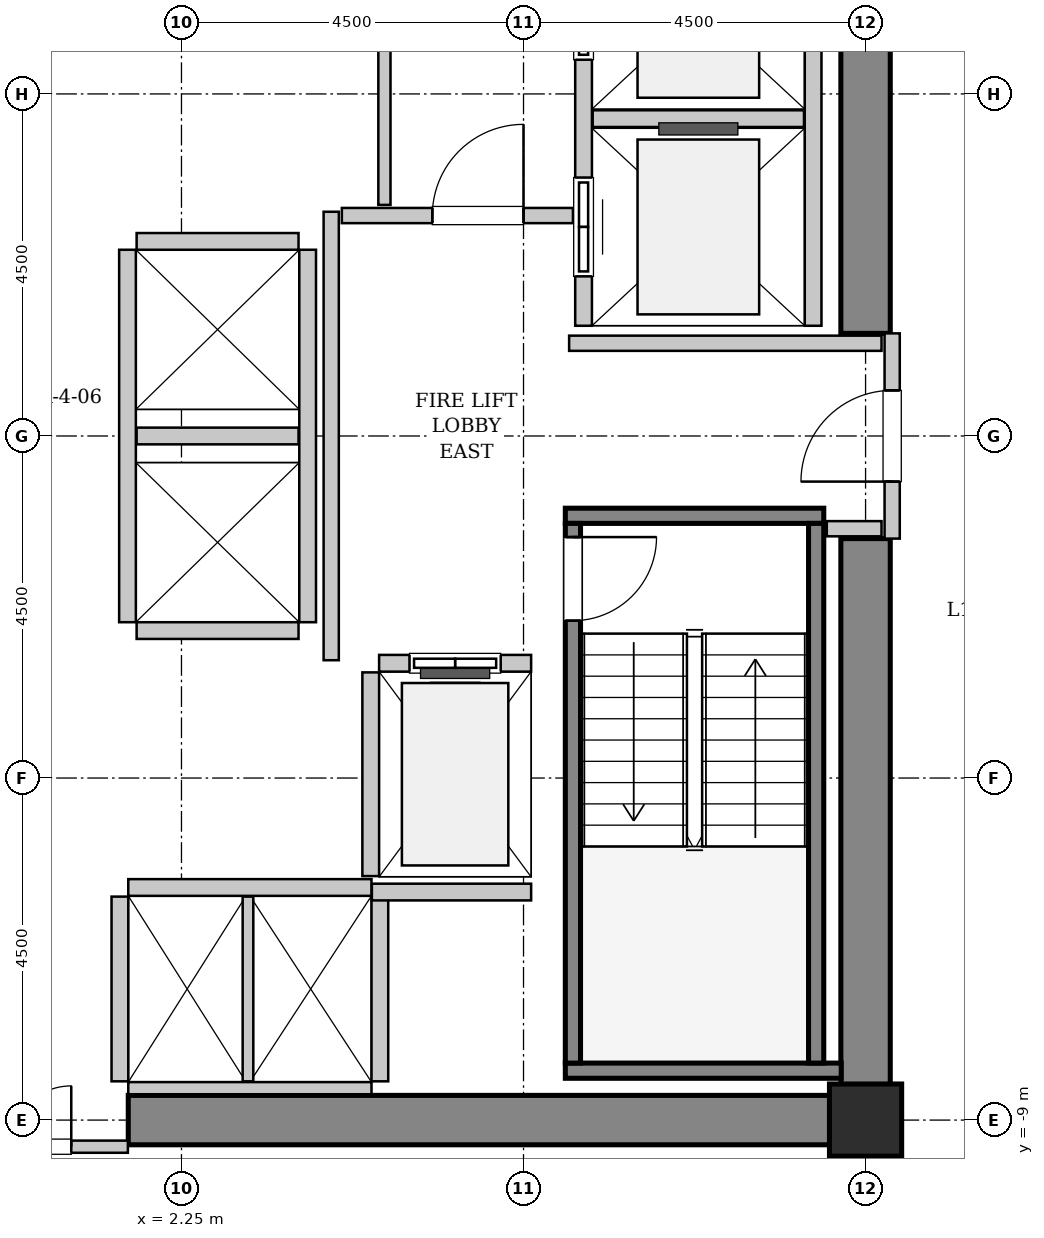
"""IFC4 building model, lengths in metres.
Left out: names, types, materials, properties, quantities, classifications, styles, units other than length and angle.
Written with IfcOpenShell. Run it as: python <this file> out.ifc"""

import sys

from ifc_helpers import new_model, si_unit, direction, frame, frame_2d, origin, origin_2d, place, context, subcontext, project, spatial, rectangle, hollow_rectangle, extrude, source, transform, mapped, element, fill, save


model = new_model("IFC4")
c1 = context("Model", 3, precision=1e-05, world=origin(), true_north=direction((0.0, 1.0)))
c2 = subcontext(c1, "Body", "Model", "MODEL_VIEW")
j1 = project(units=[si_unit("LENGTHUNIT", "METRE"), si_unit("PLANEANGLEUNIT", "RADIAN")], contexts=[c1])
p1 = place(None, origin())
s1 = spatial("IfcSite", under=j1, at=p1, CompositionType="ELEMENT")
p2 = place(p1, origin())
s2 = spatial("IfcBuilding", under=s1, at=p2, CompositionType="ELEMENT")
p3 = place(p2, frame((0.0, 0.0, 63.4)))
s3 = spatial("IfcBuildingStorey", under=s2, at=p3, CompositionType="ELEMENT", Elevation=63.4)
m1 = source(origin(), c2, "Body", "SweptSolid", [
    extrude(rectangle(XDim=10.025, YDim=0.65, at=frame_2d((5.012, 0.0))), origin(), (0.0, 0.0, 1.0), 3.8),
])
p4 = place(p3, frame((1.55, -9.0, 0.0), z_axis=(0.0, 0.0, 1.0), x_axis=(1.0, 0.0, 0.0)))
e1 = element("IfcWall", 1, at=p4, inside=s3, PredefinedType="SHEAR", context=c2, shape_type="MappedRepresentation", body=[
    mapped(m1, transform((0.0, 0.0, 0.0), x_axis=(1.0, 0.0, 0.0), y_axis=(0.0, 1.0, 0.0), z_axis=(0.0, 0.0, 1.0), scale=1.0)),
])
m2 = source(origin(), c2, "Body", "SweptSolid", [
    extrude(rectangle(XDim=7.325, YDim=0.65, at=frame_2d((3.663, 0.0))), origin(), (0.0, 0.0, 1.0), 3.8),
])
for number, where, z_axis, x_axis in (
    (2, (11.25, -8.675, 0.0), (0.0, 0.0, 1.0), (0.0, 1.0, 0.0)),
    (3, (11.25, 1.35, 0.0), (0.0, 0.0, 1.0), (0.0, 1.0, 0.0)),
):
    element("IfcWall", number, at=place(p3, frame(where, z_axis=z_axis, x_axis=x_axis)), inside=s3, PredefinedType="SHEAR", context=c2, shape_type="MappedRepresentation", body=[
        mapped(m2, transform((0.0, 0.0, 0.0), x_axis=(1.0, 0.0, 0.0), y_axis=(0.0, 1.0, 0.0), z_axis=(0.0, 0.0, 1.0), scale=1.0)),
    ])
m3 = source(origin(), c2, "Body", "SweptSolid", [
    extrude(hollow_rectangle(XDim=0.95, YDim=0.95, WallThickness=0.045, InnerFilletRadius=0.045, OuterFilletRadius=0.09, at=origin_2d()), origin(), (0.0, 0.0, 1.0), 3.8),
])
p5 = place(p3, frame((11.25, -9.0, 0.0), z_axis=(0.0, 0.0, 1.0), x_axis=(1.0, 0.0, 0.0)))
e4 = element("IfcColumn", 4, at=p5, inside=s3, PredefinedType="COLUMN", context=c2, shape_type="MappedRepresentation", body=[
    mapped(m3, transform((0.0, 0.0, 0.0), x_axis=(1.0, 0.0, 0.0), y_axis=(0.0, 1.0, 0.0), z_axis=(0.0, 0.0, 1.0), scale=1.0)),
])
m4 = source(origin(), c2, "Body", "SweptSolid", [
    extrude(rectangle(XDim=3.4, YDim=0.2, at=frame_2d((1.7, 0.0))), origin(), (0.0, 0.0, 1.0), 3.8),
])
p6 = place(p3, frame((7.3, -1.05, 0.0), z_axis=(0.0, 0.0, 1.0), x_axis=(1.0, 0.0, 0.0)))
e5 = element("IfcWall", 5, at=p6, inside=s3, PredefinedType="SOLIDWALL", context=c2, shape_type="MappedRepresentation", body=[
    mapped(m4, transform((0.0, 0.0, 0.0), x_axis=(1.0, 0.0, 0.0), y_axis=(0.0, 1.0, 0.0), z_axis=(0.0, 0.0, 1.0), scale=1.0)),
])
m5 = source(origin(), c2, "Body", "SweptSolid", [
    extrude(rectangle(XDim=3.63, YDim=0.2, at=frame_2d((1.815, 0.0))), origin(), (0.0, 0.0, 1.0), 3.8),
])
p7 = place(p3, frame((7.3, -8.35, 0.0), z_axis=(0.0, 0.0, 1.0), x_axis=(1.0, 0.0, 0.0)))
e6 = element("IfcWall", 6, at=p7, inside=s3, PredefinedType="SOLIDWALL", context=c2, shape_type="MappedRepresentation", body=[
    mapped(m5, transform((0.0, 0.0, 0.0), x_axis=(1.0, 0.0, 0.0), y_axis=(0.0, 1.0, 0.0), z_axis=(0.0, 0.0, 1.0), scale=1.0)),
])
m6 = source(origin(), c2, "Body", "SweptSolid", [
    extrude(rectangle(XDim=7.1, YDim=0.2, at=frame_2d((3.55, 0.0))), origin(), (0.0, 0.0, 1.0), 3.8),
])
p8 = place(p3, frame((7.4, -1.15, 0.0), z_axis=(0.0, 0.0, 1.0), x_axis=(0.0, -1.0, 0.0)))
e7 = element("IfcWall", 7, at=p8, inside=s3, PredefinedType="SOLIDWALL", context=c2, shape_type="MappedRepresentation", body=[
    mapped(m6, transform((0.0, 0.0, 0.0), x_axis=(1.0, 0.0, 0.0), y_axis=(0.0, 1.0, 0.0), z_axis=(0.0, 0.0, 1.0), scale=1.0)),
])
p9 = place(p8, frame((0.18, 0.0, 0.0)))
e8 = element("IfcOpeningElement", 8, at=p9, cuts=e7, PredefinedType="OPENING", context=c2, shape_type="SweptSolid", body=[
    extrude(rectangle(XDim=1.1, YDim=2.15, at=frame_2d((0.55, 1.075))), frame((0.0, 0.11, 0.0), z_axis=(0.0, -1.0, 0.0), x_axis=(1.0, 0.0, 0.0)), (0.0, 0.0, 1.0), 0.22),
])
p10 = place(p3, frame((10.6, -1.15, 0.0), z_axis=(0.0, 0.0, 1.0), x_axis=(0.0, -1.0, 0.0)))
e9 = element("IfcWall", 9, at=p10, inside=s3, PredefinedType="SOLIDWALL", context=c2, shape_type="MappedRepresentation", body=[
    mapped(m6, transform((0.0, 0.0, 0.0), x_axis=(1.0, 0.0, 0.0), y_axis=(0.0, 1.0, 0.0), z_axis=(0.0, 0.0, 1.0), scale=1.0)),
])
m7 = source(origin(), c2, "Body", "SweptSolid", [
    extrude(rectangle(XDim=2.0, YDim=0.22, at=frame_2d((1.0, 0.0))), origin(), (0.0, 0.0, 1.0), 3.535),
])
p11 = place(p3, frame((6.85, -2.99, 0.0), z_axis=(0.0, 0.0, 1.0), x_axis=(-1.0, 0.0, 0.0)))
e10 = element("IfcWall", 10, at=p11, inside=s3, PredefinedType="SOLIDWALL", context=c2, shape_type="MappedRepresentation", body=[
    mapped(m7, transform((0.0, 0.0, 0.0), x_axis=(1.0, 0.0, 0.0), y_axis=(0.0, 1.0, 0.0), z_axis=(0.0, 0.0, 1.0), scale=1.0)),
])
p12 = place(p11, frame((0.4, 0.0, 0.0)))
e11 = element("IfcOpeningElement", 11, at=p12, cuts=e10, PredefinedType="OPENING", context=c2, shape_type="SweptSolid", body=[
    extrude(rectangle(XDim=1.2, YDim=2.2, at=frame_2d((0.6, 1.1))), frame((0.0, 0.12, 0.0), z_axis=(0.0, -1.0, 0.0), x_axis=(1.0, 0.0, 0.0)), (0.0, 0.0, 1.0), 0.24),
])
m8 = source(origin(), c2, "Body", "SweptSolid", [
    extrude(rectangle(XDim=2.68, YDim=0.22, at=frame_2d((1.34, 0.0))), origin(), (0.0, 0.0, 1.0), 3.535),
])
p13 = place(p3, frame((4.74, -3.11, 0.0), z_axis=(0.0, 0.0, 1.0), x_axis=(0.0, -1.0, 0.0)))
e12 = element("IfcWall", 12, at=p13, inside=s3, PredefinedType="SOLIDWALL", context=c2, shape_type="MappedRepresentation", body=[
    mapped(m8, transform((0.0, 0.0, 0.0), x_axis=(1.0, 0.0, 0.0), y_axis=(0.0, 1.0, 0.0), z_axis=(0.0, 0.0, 1.0), scale=1.0)),
])
m9 = source(origin(), c2, "Body", "SweptSolid", [
    extrude(rectangle(XDim=5.45, YDim=0.22, at=frame_2d((2.725, 0.0))), origin(), (0.0, 0.0, 1.0), 3.535),
])
p14 = place(p3, frame((7.54, 6.9, 0.0), z_axis=(0.0, 0.0, 1.0), x_axis=(0.0, -1.0, 0.0)))
e13 = element("IfcWall", 13, at=p14, inside=s3, PredefinedType="SOLIDWALL", context=c2, shape_type="MappedRepresentation", body=[
    mapped(m9, transform((0.0, 0.0, 0.0), x_axis=(1.0, 0.0, 0.0), y_axis=(0.0, 1.0, 0.0), z_axis=(0.0, 0.0, 1.0), scale=1.0)),
])
p15 = place(p14, frame((3.5, 0.0, 0.0)))
e14 = element("IfcOpeningElement", 14, at=p15, cuts=e13, PredefinedType="OPENING", context=c2, shape_type="SweptSolid", body=[
    extrude(rectangle(XDim=1.3, YDim=2.3, at=frame_2d((0.65, 1.15))), frame((0.0, 0.12, 0.0), z_axis=(0.0, -1.0, 0.0), x_axis=(1.0, 0.0, 0.0)), (0.0, 0.0, 1.0), 0.24),
])
p16 = place(p14, frame((0.65, 0.0, 0.0)))
e15 = element("IfcOpeningElement", 15, at=p16, cuts=e13, PredefinedType="OPENING", context=c2, shape_type="SweptSolid", body=[
    extrude(rectangle(XDim=1.3, YDim=2.3, at=frame_2d((0.65, 1.15))), frame((0.0, 0.12, 0.0), z_axis=(0.0, -1.0, 0.0), x_axis=(1.0, 0.0, 0.0)), (0.0, 0.0, 1.0), 0.24),
])
p17 = place(p3, frame((10.56, 1.45, 0.0), z_axis=(0.0, 0.0, 1.0), x_axis=(0.0, 1.0, 0.0)))
e16 = element("IfcWall", 16, at=p17, inside=s3, PredefinedType="SOLIDWALL", context=c2, shape_type="MappedRepresentation", body=[
    mapped(m9, transform((0.0, 0.0, 0.0), x_axis=(1.0, 0.0, 0.0), y_axis=(0.0, 1.0, 0.0), z_axis=(0.0, 0.0, 1.0), scale=1.0)),
])
m10 = source(origin(), c2, "Body", "SweptSolid", [
    extrude(rectangle(XDim=2.78, YDim=0.22, at=frame_2d((1.39, 0.0))), origin(), (0.0, 0.0, 1.0), 3.535),
])
p18 = place(p3, frame((7.66, 4.175, 0.0), z_axis=(0.0, 0.0, 1.0), x_axis=(1.0, 0.0, 0.0)))
e17 = element("IfcWall", 17, at=p18, inside=s3, PredefinedType="SOLIDWALL", context=c2, shape_type="MappedRepresentation", body=[
    mapped(m10, transform((0.0, 0.0, 0.0), x_axis=(1.0, 0.0, 0.0), y_axis=(0.0, 1.0, 0.0), z_axis=(0.0, 0.0, 1.0), scale=1.0)),
])
m11 = source(origin(), c2, "Body", "SweptSolid", [
    extrude(rectangle(XDim=3.2, YDim=0.22, at=frame_2d((1.6, 0.0))), origin(), (0.0, 0.0, 1.0), 3.535),
])
p19 = place(p3, frame((4.75, -5.94, 0.0), z_axis=(0.0, 0.0, 1.0), x_axis=(-1.0, 0.0, 0.0)))
e18 = element("IfcWall", 18, at=p19, inside=s3, PredefinedType="SOLIDWALL", context=c2, shape_type="MappedRepresentation", body=[
    mapped(m11, transform((0.0, 0.0, 0.0), x_axis=(1.0, 0.0, 0.0), y_axis=(0.0, 1.0, 0.0), z_axis=(0.0, 0.0, 1.0), scale=1.0)),
])
m12 = source(origin(), c2, "Body", "SweptSolid", [
    extrude(rectangle(XDim=3.2, YDim=0.16, at=frame_2d((1.6, 0.0))), origin(), (0.0, 0.0, 1.0), 2.425),
])
p20 = place(p3, frame((1.55, -8.58, 0.0), z_axis=(0.0, 0.0, 1.0), x_axis=(1.0, 0.0, 0.0)))
e19 = element("IfcWall", 19, at=p20, inside=s3, PredefinedType="PARTITIONING", context=c2, shape_type="MappedRepresentation", body=[
    mapped(m12, transform((0.0, 0.0, 0.0), x_axis=(1.0, 0.0, 0.0), y_axis=(0.0, 1.0, 0.0), z_axis=(0.0, 0.0, 1.0), scale=1.0)),
])
m13 = source(origin(), c2, "Body", "SweptSolid", [
    extrude(rectangle(XDim=2.43, YDim=0.22, at=frame_2d((1.215, 0.0))), origin(), (0.0, 0.0, 1.0), 3.535),
])
p21 = place(p3, frame((1.44, -6.06, 0.0), z_axis=(0.0, 0.0, 1.0), x_axis=(0.0, -1.0, 0.0)))
e20 = element("IfcWall", 20, at=p21, inside=s3, PredefinedType="SOLIDWALL", context=c2, shape_type="MappedRepresentation", body=[
    mapped(m13, transform((0.0, 0.0, 0.0), x_axis=(1.0, 0.0, 0.0), y_axis=(0.0, 1.0, 0.0), z_axis=(0.0, 0.0, 1.0), scale=1.0)),
])
m14 = source(origin(), c2, "Body", "SweptSolid", [
    extrude(rectangle(XDim=2.43, YDim=0.14, at=frame_2d((1.215, 0.0))), origin(), (0.0, 0.0, 1.0), 3.535),
])
p22 = place(p3, frame((3.125, -8.49, 0.0), z_axis=(0.0, 0.0, 1.0), x_axis=(0.0, 1.0, 0.0)))
e21 = element("IfcWall", 21, at=p22, inside=s3, PredefinedType="PARTITIONING", context=c2, shape_type="MappedRepresentation", body=[
    mapped(m14, transform((0.0, 0.0, 0.0), x_axis=(1.0, 0.0, 0.0), y_axis=(0.0, 1.0, 0.0), z_axis=(0.0, 0.0, 1.0), scale=1.0)),
])
p23 = place(p3, frame((4.86, -8.49, 0.0), z_axis=(0.0, 0.0, 1.0), x_axis=(0.0, 1.0, 0.0)))
e22 = element("IfcWall", 22, at=p23, inside=s3, PredefinedType="SOLIDWALL", context=c2, shape_type="MappedRepresentation", body=[
    mapped(m13, transform((0.0, 0.0, 0.0), x_axis=(1.0, 0.0, 0.0), y_axis=(0.0, 1.0, 0.0), z_axis=(0.0, 0.0, 1.0), scale=1.0)),
])
m15 = source(origin(), c2, "Body", "SweptSolid", [
    extrude(rectangle(XDim=4.9, YDim=0.22, at=frame_2d((2.45, 0.0))), origin(), (0.0, 0.0, 1.0), 3.535),
])
for number, where, z_axis, x_axis in (
    (23, (1.54, 2.45, 0.0), (0.0, 0.0, 1.0), (0.0, -1.0, 0.0)),
    (24, (3.91, -2.45, 0.0), (0.0, 0.0, 1.0), (0.0, 1.0, 0.0)),
):
    element("IfcWall", number, at=place(p3, frame(where, z_axis=z_axis, x_axis=x_axis)), inside=s3, PredefinedType="SOLIDWALL", context=c2, shape_type="MappedRepresentation", body=[
        mapped(m15, transform((0.0, 0.0, 0.0), x_axis=(1.0, 0.0, 0.0), y_axis=(0.0, 1.0, 0.0), z_axis=(0.0, 0.0, 1.0), scale=1.0)),
    ])
m16 = source(origin(), c2, "Body", "SweptSolid", [
    extrude(rectangle(XDim=2.13, YDim=0.22, at=frame_2d((1.065, 0.0))), origin(), (0.0, 0.0, 1.0), 3.535),
])
for number, where, z_axis, x_axis in (
    (25, (1.66, -2.56, 0.0), (0.0, 0.0, 1.0), (1.0, 0.0, 0.0)),
    (26, (1.66, 0.0, 0.0), (0.0, 0.0, 1.0), (1.0, 0.0, 0.0)),
    (27, (3.79, 2.56, 0.0), (0.0, 0.0, 1.0), (-1.0, 0.0, 0.0)),
):
    element("IfcWall", number, at=place(p3, frame(where, z_axis=z_axis, x_axis=x_axis)), inside=s3, PredefinedType="SOLIDWALL", context=c2, shape_type="MappedRepresentation", body=[
        mapped(m16, transform((0.0, 0.0, 0.0), x_axis=(1.0, 0.0, 0.0), y_axis=(0.0, 1.0, 0.0), z_axis=(0.0, 0.0, 1.0), scale=1.0)),
    ])
m17 = source(origin(), c2, "Body", "SweptSolid", [
    extrude(rectangle(XDim=2.095, YDim=0.22, at=frame_2d((1.048, 0.0))), origin(), (0.0, 0.0, 1.0), 3.535),
])
p24 = place(p3, frame((4.755, -6.0, 0.0), z_axis=(0.0, 0.0, 1.0), x_axis=(1.0, 0.0, 0.0)))
e28 = element("IfcWall", 28, at=p24, inside=s3, PredefinedType="SOLIDWALL", context=c2, shape_type="MappedRepresentation", body=[
    mapped(m17, transform((0.0, 0.0, 0.0), x_axis=(1.0, 0.0, 0.0), y_axis=(0.0, 1.0, 0.0), z_axis=(0.0, 0.0, 1.0), scale=1.0)),
])
m18 = source(origin(), c2, "Body", "SweptSolid", [
    extrude(rectangle(XDim=2.7, YDim=0.2, at=frame_2d((1.35, 0.0))), origin(), (0.0, 0.0, 1.0), 2.425),
])
p25 = place(p3, frame((11.6, -1.35, 0.0), z_axis=(0.0, 0.0, 1.0), x_axis=(0.0, 1.0, 0.0)))
e29 = element("IfcWall", 29, at=p25, inside=s3, PredefinedType="PARTITIONING", context=c2, shape_type="MappedRepresentation", body=[
    mapped(m18, transform((0.0, 0.0, 0.0), x_axis=(1.0, 0.0, 0.0), y_axis=(0.0, 1.0, 0.0), z_axis=(0.0, 0.0, 1.0), scale=1.0)),
])
p26 = place(p25, frame((0.75, 0.0, 0.0)))
e30 = element("IfcOpeningElement", 30, at=p26, cuts=e29, PredefinedType="OPENING", context=c2, shape_type="SweptSolid", body=[
    extrude(rectangle(XDim=1.2, YDim=2.15, at=frame_2d((0.6, 1.075))), frame((0.0, 0.11, 0.0), z_axis=(0.0, -1.0, 0.0), x_axis=(1.0, 0.0, 0.0)), (0.0, 0.0, 1.0), 0.22),
])
m19 = source(origin(), c2, "Body", "SweptSolid", [
    extrude(rectangle(XDim=5.9, YDim=0.2, at=frame_2d((2.95, 0.0))), origin(), (0.0, 0.0, 1.0), 3.535),
])
p27 = place(p3, frame((4.22, -2.95, 0.0), z_axis=(0.0, 0.0, 1.0), x_axis=(0.0, 1.0, 0.0)))
e31 = element("IfcWall", 31, at=p27, inside=s3, PredefinedType="PARTITIONING", context=c2, shape_type="MappedRepresentation", body=[
    mapped(m19, transform((0.0, 0.0, 0.0), x_axis=(1.0, 0.0, 0.0), y_axis=(0.0, 1.0, 0.0), z_axis=(0.0, 0.0, 1.0), scale=1.0)),
])
m20 = source(origin(), c2, "Body", "SweptSolid", [
    extrude(rectangle(XDim=3.04, YDim=0.2, at=frame_2d((1.52, 0.0))), origin(), (0.0, 0.0, 1.0), 3.535),
])
p28 = place(p3, frame((4.36, 2.9, 0.0), z_axis=(0.0, 0.0, 1.0), x_axis=(1.0, 0.0, 0.0)))
e32 = element("IfcWall", 32, at=p28, inside=s3, PredefinedType="PARTITIONING", context=c2, shape_type="MappedRepresentation", body=[
    mapped(m20, transform((0.0, 0.0, 0.0), x_axis=(1.0, 0.0, 0.0), y_axis=(0.0, 1.0, 0.0), z_axis=(0.0, 0.0, 1.0), scale=1.0)),
])
p29 = place(p28, frame((1.19, 0.0, 0.0)))
e33 = element("IfcOpeningElement", 33, at=p29, cuts=e32, PredefinedType="OPENING", context=c2, shape_type="SweptSolid", body=[
    extrude(rectangle(XDim=1.2, YDim=2.15, at=frame_2d((0.6, 1.075))), frame((0.0, 0.11, 0.0), z_axis=(0.0, -1.0, 0.0), x_axis=(1.0, 0.0, 0.0)), (0.0, 0.0, 1.0), 0.22),
])
m21 = source(origin(), c2, "Body", "SweptSolid", [
    extrude(rectangle(XDim=4.11, YDim=0.2, at=frame_2d((2.055, 0.0))), origin(), (0.0, 0.0, 1.0), 3.535),
])
p30 = place(p3, frame((7.35, 1.22, 0.0), z_axis=(0.0, 0.0, 1.0), x_axis=(1.0, 0.0, 0.0)))
e34 = element("IfcWall", 34, at=p30, inside=s3, PredefinedType="PARTITIONING", context=c2, shape_type="MappedRepresentation", body=[
    mapped(m21, transform((0.0, 0.0, 0.0), x_axis=(1.0, 0.0, 0.0), y_axis=(0.0, 1.0, 0.0), z_axis=(0.0, 0.0, 1.0), scale=1.0)),
])
m22 = source(origin(), c2, "Body", "SweptSolid", [
    extrude(rectangle(XDim=0.72, YDim=0.2, at=frame_2d((0.36, 0.0))), origin(), (0.0, 0.0, 1.0), 3.535),
])
p31 = place(p3, frame((10.74, -1.22, 0.0), z_axis=(0.0, 0.0, 1.0), x_axis=(1.0, 0.0, 0.0)))
e35 = element("IfcWall", 35, at=p31, inside=s3, PredefinedType="PARTITIONING", context=c2, shape_type="MappedRepresentation", body=[
    mapped(m22, transform((0.0, 0.0, 0.0), x_axis=(1.0, 0.0, 0.0), y_axis=(0.0, 1.0, 0.0), z_axis=(0.0, 0.0, 1.0), scale=1.0)),
])
m23 = source(origin(), c2, "Body", "SweptSolid", [
    extrude(rectangle(XDim=3.09, YDim=0.16, at=frame_2d((1.545, 0.0))), origin(), (0.0, 0.0, 1.0), 2.425),
])
p32 = place(p3, frame((-1.545, -9.35, 0.0), z_axis=(0.0, 0.0, 1.0), x_axis=(1.0, 0.0, 0.0)))
e36 = element("IfcWall", 36, at=p32, inside=s3, PredefinedType="PARTITIONING", context=c2, shape_type="MappedRepresentation", body=[
    mapped(m23, transform((0.0, 0.0, 0.0), x_axis=(1.0, 0.0, 0.0), y_axis=(0.0, 1.0, 0.0), z_axis=(0.0, 0.0, 1.0), scale=1.0)),
])
p33 = place(p32, frame((0.745, 0.0, 0.0)))
e37 = element("IfcOpeningElement", 37, at=p33, cuts=e36, PredefinedType="OPENING", context=c2, shape_type="SweptSolid", body=[
    extrude(rectangle(XDim=1.6, YDim=2.3, at=frame_2d((0.8, 1.15))), frame((0.0, 0.09, 0.0), z_axis=(0.0, -1.0, 0.0), x_axis=(1.0, 0.0, 0.0)), (0.0, 0.0, 1.0), 0.18),
])
m24 = source(origin(), c2, "Body", "SweptSolid", [
    extrude(rectangle(XDim=3.015, YDim=0.16, at=frame_2d((1.507, 0.0))), origin(), (0.0, 0.0, 1.0), 3.535),
])
p34 = place(p3, frame((4.92, 3.04, 0.0), z_axis=(0.0, 0.0, 1.0), x_axis=(0.0, 1.0, 0.0)))
e38 = element("IfcWall", 38, at=p34, inside=s3, PredefinedType="PARTITIONING", context=c2, shape_type="MappedRepresentation", body=[
    mapped(m24, transform((0.0, 0.0, 0.0), x_axis=(1.0, 0.0, 0.0), y_axis=(0.0, 1.0, 0.0), z_axis=(0.0, 0.0, 1.0), scale=1.0)),
])
m25 = source(origin(), c2, "Body", "SweptSolid", [
    extrude(rectangle(XDim=1.1, YDim=2.15, at=frame_2d((0.55, 1.075))), frame((0.0, 0.025, 0.0), z_axis=(0.0, -1.0, 0.0), x_axis=(1.0, 0.0, 0.0)), (0.0, 0.0, 1.0), 0.05),
])
p35 = place(p9, origin())
e39 = element("IfcDoor", 39, at=p35, inside=s3, OperationType="SINGLE_SWING_LEFT", PredefinedType="DOOR", context=c2, shape_type="MappedRepresentation", body=[
    mapped(m25, transform((0.0, 0.0, 0.0), x_axis=(1.0, 0.0, 0.0), y_axis=(0.0, 1.0, 0.0), z_axis=(0.0, 0.0, 1.0), scale=1.0)),
])
fill(e8, e39)
m26 = source(origin(), c2, "Body", "SweptSolid", [
    extrude(rectangle(XDim=1.2, YDim=2.2, at=frame_2d((0.6, 1.1))), frame((0.0, 0.025, 0.0), z_axis=(0.0, -1.0, 0.0), x_axis=(1.0, 0.0, 0.0)), (0.0, 0.0, 1.0), 0.05),
])
p36 = place(p12, origin())
e40 = element("IfcDoor", 40, at=p36, inside=s3, OperationType="SLIDING_TO_LEFT", PredefinedType="DOOR", context=c2, shape_type="MappedRepresentation", body=[
    mapped(m26, transform((0.0, 0.0, 0.0), x_axis=(1.0, 0.0, 0.0), y_axis=(0.0, 1.0, 0.0), z_axis=(0.0, 0.0, 1.0), scale=1.0)),
])
fill(e11, e40)
m27 = source(origin(), c2, "Body", "SweptSolid", [
    extrude(rectangle(XDim=1.3, YDim=2.3, at=frame_2d((0.65, 1.15))), frame((0.0, 0.025, 0.0), z_axis=(0.0, -1.0, 0.0), x_axis=(1.0, 0.0, 0.0)), (0.0, 0.0, 1.0), 0.05),
])
p37 = place(p15, origin())
e41 = element("IfcDoor", 41, at=p37, inside=s3, OperationType="SLIDING_TO_RIGHT", PredefinedType="DOOR", context=c2, shape_type="MappedRepresentation", body=[
    mapped(m27, transform((0.0, 0.0, 0.0), x_axis=(1.0, 0.0, 0.0), y_axis=(0.0, 1.0, 0.0), z_axis=(0.0, 0.0, 1.0), scale=1.0)),
])
fill(e14, e41)
p38 = place(p16, origin())
e42 = element("IfcDoor", 42, at=p38, inside=s3, OperationType="SLIDING_TO_RIGHT", PredefinedType="DOOR", context=c2, shape_type="MappedRepresentation", body=[
    mapped(m27, transform((0.0, 0.0, 0.0), x_axis=(1.0, 0.0, 0.0), y_axis=(0.0, 1.0, 0.0), z_axis=(0.0, 0.0, 1.0), scale=1.0)),
])
fill(e15, e42)
m28 = source(origin(), c2, "Body", "SweptSolid", [
    extrude(rectangle(XDim=1.2, YDim=2.15, at=frame_2d((0.6, 1.075))), frame((0.0, 0.025, 0.0), z_axis=(0.0, -1.0, 0.0), x_axis=(1.0, 0.0, 0.0)), (0.0, 0.0, 1.0), 0.05),
])
p39 = place(p26, origin())
e43 = element("IfcDoor", 43, at=p39, inside=s3, OperationType="SINGLE_SWING_LEFT", PredefinedType="DOOR", context=c2, shape_type="MappedRepresentation", body=[
    mapped(m28, transform((0.0, 0.0, 0.0), x_axis=(1.0, 0.0, 0.0), y_axis=(0.0, 1.0, 0.0), z_axis=(0.0, 0.0, 1.0), scale=1.0)),
])
fill(e30, e43)
p40 = place(p29, origin())
e44 = element("IfcDoor", 44, at=p40, inside=s3, OperationType="SINGLE_SWING_RIGHT", PredefinedType="DOOR", context=c2, shape_type="MappedRepresentation", body=[
    mapped(m28, transform((0.0, 0.0, 0.0), x_axis=(1.0, 0.0, 0.0), y_axis=(0.0, 1.0, 0.0), z_axis=(0.0, 0.0, 1.0), scale=1.0)),
])
fill(e33, e44)
m29 = source(origin(), c2, "Body", "SweptSolid", [
    extrude(rectangle(XDim=1.6, YDim=2.3, at=frame_2d((0.8, 1.15))), frame((0.0, 0.025, 0.0), z_axis=(0.0, -1.0, 0.0), x_axis=(1.0, 0.0, 0.0)), (0.0, 0.0, 1.0), 0.05),
])
p41 = place(p33, origin())
e45 = element("IfcDoor", 45, at=p41, inside=s3, OperationType="DOUBLE_DOOR_SINGLE_SWING", PredefinedType="DOOR", context=c2, shape_type="MappedRepresentation", body=[
    mapped(m29, transform((0.0, 0.0, 0.0), x_axis=(1.0, 0.0, 0.0), y_axis=(0.0, 1.0, 0.0), z_axis=(0.0, 0.0, 1.0), scale=1.0)),
])
fill(e37, e45)
save(model, sys.argv[1])
